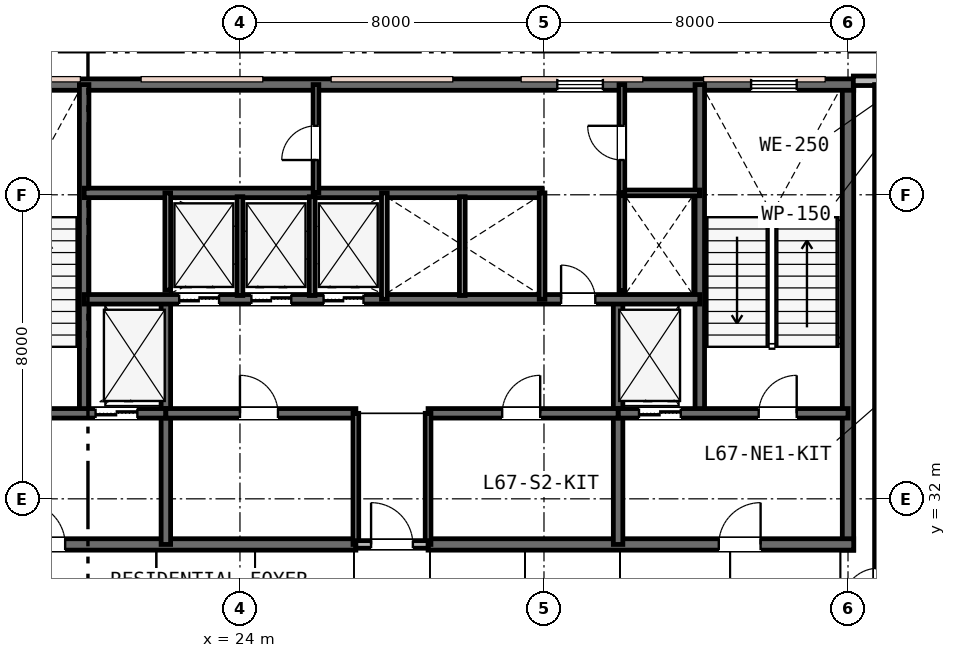
"""IFC4 building model, lengths in metres.
Left out: names, types, materials, properties, quantities, classifications, styles, units other than length and angle.
Written with IfcOpenShell. Run it as: python <this file> out.ifc"""

import sys

from ifc_helpers import new_model, si_unit, direction, frame, frame_2d, origin, place, context, subcontext, project, spatial, rectangle, extrude, element, fill, save


model = new_model("IFC4")
c1 = context("Model", 3, precision=1e-05, world=origin(), true_north=direction((0.0, 1.0)))
c2 = subcontext(c1, "Body", "Model", "MODEL_VIEW")
j1 = project(units=[si_unit("LENGTHUNIT", "METRE"), si_unit("PLANEANGLEUNIT", "RADIAN")], contexts=[c1])
p1 = place(None, origin())
s1 = spatial("IfcSite", under=j1, at=p1, CompositionType="ELEMENT")
p2 = place(p1, origin())
s2 = spatial("IfcBuilding", under=s1, at=p2, CompositionType="ELEMENT")
p3 = place(p2, frame((0.0, 0.0, 260.2)))
s3 = spatial("IfcBuildingStorey", under=s2, at=p3, CompositionType="ELEMENT", Elevation=260.2)
p4 = place(p3, frame((40.0, 30.65, 0.0), z_axis=(0.0, 0.0, 1.0), x_axis=(0.0, 1.0, 0.0)))
e1 = element("IfcWall", 1, at=p4, inside=s3, PredefinedType="SHEAR", context=c2, shape_type="SweptSolid", body=[
    extrude(rectangle(XDim=12.3, YDim=0.3, at=frame_2d((6.15, 0.0))), origin(), (0.0, 0.0, 1.0), 3.8),
])
p5 = place(p3, frame((15.85, 42.9, 0.0), z_axis=(0.0, 0.0, 1.0), x_axis=(1.0, 0.0, 0.0)))
e2 = element("IfcWall", 2, at=p5, inside=s3, PredefinedType="SHEAR", context=c2, shape_type="SweptSolid", body=[
    extrude(rectangle(XDim=24.3, YDim=0.3, at=frame_2d((12.15, 0.0))), origin(), (0.0, 0.0, 1.0), 3.8),
])
p6 = place(p5, frame((1.6, 0.0, 0.95)))
e3 = element("IfcOpeningElement", 3, at=p6, cuts=e2, PredefinedType="OPENING", context=c2, shape_type="SweptSolid", body=[
    extrude(rectangle(XDim=1.2, YDim=1.6, at=frame_2d((0.6, 0.8))), frame((0.0, 0.16, 0.0), z_axis=(0.0, -1.0, 0.0), x_axis=(1.0, 0.0, 0.0)), (0.0, 0.0, 1.0), 0.32),
])
p7 = place(p5, frame((16.5, 0.0, 0.95)))
e4 = element("IfcOpeningElement", 4, at=p7, cuts=e2, PredefinedType="OPENING", context=c2, shape_type="SweptSolid", body=[
    extrude(rectangle(XDim=1.2, YDim=1.6, at=frame_2d((0.6, 0.8))), frame((0.0, 0.16, 0.0), z_axis=(0.0, -1.0, 0.0), x_axis=(1.0, 0.0, 0.0)), (0.0, 0.0, 1.0), 0.32),
])
p8 = place(p5, frame((21.6, 0.0, 0.95)))
e5 = element("IfcOpeningElement", 5, at=p8, cuts=e2, PredefinedType="OPENING", context=c2, shape_type="SweptSolid", body=[
    extrude(rectangle(XDim=1.2, YDim=1.6, at=frame_2d((0.6, 0.8))), frame((0.0, 0.16, 0.0), z_axis=(0.0, -1.0, 0.0), x_axis=(1.0, 0.0, 0.0)), (0.0, 0.0, 1.0), 0.32),
])
p9 = place(p3, frame((15.85, 30.8, 0.0), z_axis=(0.0, 0.0, 1.0), x_axis=(1.0, 0.0, 0.0)))
e6 = element("IfcWall", 6, at=p9, inside=s3, PredefinedType="SHEAR", context=c2, shape_type="SweptSolid", body=[
    extrude(rectangle(XDim=11.2, YDim=0.3, at=frame_2d((5.6, 0.0))), origin(), (0.0, 0.0, 1.0), 3.8),
])
p10 = place(p9, frame((2.45, 0.0, 0.0)))
e7 = element("IfcOpeningElement", 7, at=p10, cuts=e6, PredefinedType="OPENING", context=c2, shape_type="SweptSolid", body=[
    extrude(rectangle(XDim=1.1, YDim=2.15, at=frame_2d((0.55, 1.075))), frame((0.0, 0.16, 0.0), z_axis=(0.0, -1.0, 0.0), x_axis=(1.0, 0.0, 0.0)), (0.0, 0.0, 1.0), 0.32),
])
p11 = place(p3, frame((28.95, 30.8, 0.0), z_axis=(0.0, 0.0, 1.0), x_axis=(1.0, 0.0, 0.0)))
e8 = element("IfcWall", 8, at=p11, inside=s3, PredefinedType="SHEAR", context=c2, shape_type="SweptSolid", body=[
    extrude(rectangle(XDim=11.2, YDim=0.3, at=frame_2d((5.6, 0.0))), origin(), (0.0, 0.0, 1.0), 3.8),
])
p12 = place(p11, frame((7.65, 0.0, 0.0)))
e9 = element("IfcOpeningElement", 9, at=p12, cuts=e8, PredefinedType="OPENING", context=c2, shape_type="SweptSolid", body=[
    extrude(rectangle(XDim=1.1, YDim=2.15, at=frame_2d((0.55, 1.075))), frame((0.0, 0.16, 0.0), z_axis=(0.0, -1.0, 0.0), x_axis=(1.0, 0.0, 0.0)), (0.0, 0.0, 1.0), 0.32),
])
for number, where, z_axis, x_axis in (
    (10, (19.9, 34.25, 0.0), (0.0, 0.0, 1.0), (0.0, 1.0, 0.0)),
    (11, (36.1, 34.25, 0.0), (0.0, 0.0, 1.0), (0.0, 1.0, 0.0)),
):
    element("IfcWall", number, at=place(p3, frame(where, z_axis=z_axis, x_axis=x_axis)), inside=s3, PredefinedType="SHEAR", context=c2, shape_type="SweptSolid", body=[
        extrude(rectangle(XDim=8.65, YDim=0.25, at=frame_2d((4.325, 0.0))), origin(), (0.0, 0.0, 1.0), 3.8),
    ])
for number, where, z_axis, x_axis in (
    (12, (22.05, 30.8, 0.0), (0.0, 0.0, 1.0), (0.0, 1.0, 0.0)),
    (13, (33.95, 30.8, 0.0), (0.0, 0.0, 1.0), (0.0, 1.0, 0.0)),
):
    element("IfcWall", number, at=place(p3, frame(where, z_axis=z_axis, x_axis=x_axis)), inside=s3, PredefinedType="SHEAR", context=c2, shape_type="SweptSolid", body=[
        extrude(rectangle(XDim=6.45, YDim=0.25, at=frame_2d((3.225, 0.0))), origin(), (0.0, 0.0, 1.0), 3.8),
    ])
p13 = place(p3, frame((16.0, 34.25, 0.0), z_axis=(0.0, 0.0, 1.0), x_axis=(1.0, 0.0, 0.0)))
e14 = element("IfcWall", 14, at=p13, inside=s3, PredefinedType="SHEAR", context=c2, shape_type="SweptSolid", body=[
    extrude(rectangle(XDim=6.05, YDim=0.25, at=frame_2d((3.025, 0.0))), origin(), (0.0, 0.0, 1.0), 3.8),
])
p14 = place(p13, frame((1.25, 0.0, 0.0)))
e15 = element("IfcOpeningElement", 15, at=p14, cuts=e14, PredefinedType="OPENING", context=c2, shape_type="SweptSolid", body=[
    extrude(rectangle(XDim=1.0, YDim=2.15, at=frame_2d((0.5, 1.075))), frame((0.0, 0.135, 0.0), z_axis=(0.0, -1.0, 0.0), x_axis=(1.0, 0.0, 0.0)), (0.0, 0.0, 1.0), 0.27),
])
p15 = place(p13, frame((4.2, 0.0, 0.0)))
e16 = element("IfcOpeningElement", 16, at=p15, cuts=e14, PredefinedType="OPENING", context=c2, shape_type="SweptSolid", body=[
    extrude(rectangle(XDim=1.1, YDim=2.15, at=frame_2d((0.55, 1.075))), frame((0.0, 0.135, 0.0), z_axis=(0.0, -1.0, 0.0), x_axis=(1.0, 0.0, 0.0)), (0.0, 0.0, 1.0), 0.27),
])
p16 = place(p3, frame((33.95, 34.25, 0.0), z_axis=(0.0, 0.0, 1.0), x_axis=(1.0, 0.0, 0.0)))
e17 = element("IfcWall", 17, at=p16, inside=s3, PredefinedType="SHEAR", context=c2, shape_type="SweptSolid", body=[
    extrude(rectangle(XDim=6.05, YDim=0.25, at=frame_2d((3.025, 0.0))), origin(), (0.0, 0.0, 1.0), 3.8),
])
p17 = place(p16, frame((3.7, 0.0, 0.0)))
e18 = element("IfcOpeningElement", 18, at=p17, cuts=e17, PredefinedType="OPENING", context=c2, shape_type="SweptSolid", body=[
    extrude(rectangle(XDim=1.0, YDim=2.15, at=frame_2d((0.5, 1.075))), frame((0.0, 0.135, 0.0), z_axis=(0.0, -1.0, 0.0), x_axis=(1.0, 0.0, 0.0)), (0.0, 0.0, 1.0), 0.27),
])
p18 = place(p16, frame((0.55, 0.0, 0.0)))
e19 = element("IfcOpeningElement", 19, at=p18, cuts=e17, PredefinedType="OPENING", context=c2, shape_type="SweptSolid", body=[
    extrude(rectangle(XDim=1.1, YDim=2.15, at=frame_2d((0.55, 1.075))), frame((0.0, 0.135, 0.0), z_axis=(0.0, -1.0, 0.0), x_axis=(1.0, 0.0, 0.0)), (0.0, 0.0, 1.0), 0.27),
])
p19 = place(p3, frame((22.05, 34.25, 0.0), z_axis=(0.0, 0.0, 1.0), x_axis=(1.0, 0.0, 0.0)))
e20 = element("IfcWall", 20, at=p19, inside=s3, PredefinedType="SHEAR", context=c2, shape_type="SweptSolid", body=[
    extrude(rectangle(XDim=5.0, YDim=0.25, at=frame_2d((2.5, 0.0))), origin(), (0.0, 0.0, 1.0), 3.8),
])
p20 = place(p19, frame((1.95, 0.0, 0.0)))
e21 = element("IfcOpeningElement", 21, at=p20, cuts=e20, PredefinedType="OPENING", context=c2, shape_type="SweptSolid", body=[
    extrude(rectangle(XDim=1.0, YDim=2.15, at=frame_2d((0.5, 1.075))), frame((0.0, 0.135, 0.0), z_axis=(0.0, -1.0, 0.0), x_axis=(1.0, 0.0, 0.0)), (0.0, 0.0, 1.0), 0.27),
])
p21 = place(p3, frame((28.95, 34.25, 0.0), z_axis=(0.0, 0.0, 1.0), x_axis=(1.0, 0.0, 0.0)))
e22 = element("IfcWall", 22, at=p21, inside=s3, PredefinedType="SHEAR", context=c2, shape_type="SweptSolid", body=[
    extrude(rectangle(XDim=5.0, YDim=0.25, at=frame_2d((2.5, 0.0))), origin(), (0.0, 0.0, 1.0), 3.8),
])
p22 = place(p21, frame((1.95, 0.0, 0.0)))
e23 = element("IfcOpeningElement", 23, at=p22, cuts=e22, PredefinedType="OPENING", context=c2, shape_type="SweptSolid", body=[
    extrude(rectangle(XDim=1.0, YDim=2.15, at=frame_2d((0.5, 1.075))), frame((0.0, 0.135, 0.0), z_axis=(0.0, -1.0, 0.0), x_axis=(1.0, 0.0, 0.0)), (0.0, 0.0, 1.0), 0.27),
])
p23 = place(p3, frame((19.9, 37.25, 0.0), z_axis=(0.0, 0.0, 1.0), x_axis=(1.0, 0.0, 0.0)))
e24 = element("IfcWall", 24, at=p23, inside=s3, PredefinedType="SHEAR", context=c2, shape_type="SweptSolid", body=[
    extrude(rectangle(XDim=16.2, YDim=0.25, at=frame_2d((8.1, 0.0))), origin(), (0.0, 0.0, 1.0), 3.8),
])
p24 = place(p23, frame((12.55, 0.0, 0.0)))
e25 = element("IfcOpeningElement", 25, at=p24, cuts=e24, PredefinedType="OPENING", context=c2, shape_type="SweptSolid", body=[
    extrude(rectangle(XDim=0.9, YDim=2.15, at=frame_2d((0.45, 1.075))), frame((0.0, 0.135, 0.0), z_axis=(0.0, -1.0, 0.0), x_axis=(1.0, 0.0, 0.0)), (0.0, 0.0, 1.0), 0.27),
])
p25 = place(p23, frame((2.5, 0.0, 0.0)))
e26 = element("IfcOpeningElement", 26, at=p25, cuts=e24, PredefinedType="OPENING", context=c2, shape_type="SweptSolid", body=[
    extrude(rectangle(XDim=1.05, YDim=2.15, at=frame_2d((0.525, 1.075))), frame((0.0, 0.135, 0.0), z_axis=(0.0, -1.0, 0.0), x_axis=(1.0, 0.0, 0.0)), (0.0, 0.0, 1.0), 0.27),
])
p26 = place(p23, frame((4.4, 0.0, 0.0)))
e27 = element("IfcOpeningElement", 27, at=p26, cuts=e24, PredefinedType="OPENING", context=c2, shape_type="SweptSolid", body=[
    extrude(rectangle(XDim=1.05, YDim=2.15, at=frame_2d((0.525, 1.075))), frame((0.0, 0.135, 0.0), z_axis=(0.0, -1.0, 0.0), x_axis=(1.0, 0.0, 0.0)), (0.0, 0.0, 1.0), 0.27),
])
p27 = place(p23, frame((6.3, 0.0, 0.0)))
e28 = element("IfcOpeningElement", 28, at=p27, cuts=e24, PredefinedType="OPENING", context=c2, shape_type="SweptSolid", body=[
    extrude(rectangle(XDim=1.05, YDim=2.15, at=frame_2d((0.525, 1.075))), frame((0.0, 0.135, 0.0), z_axis=(0.0, -1.0, 0.0), x_axis=(1.0, 0.0, 0.0)), (0.0, 0.0, 1.0), 0.27),
])
p28 = place(p3, frame((19.9, 40.05, 0.0), z_axis=(0.0, 0.0, 1.0), x_axis=(1.0, 0.0, 0.0)))
e29 = element("IfcWall", 29, at=p28, inside=s3, PredefinedType="SHEAR", context=c2, shape_type="SweptSolid", body=[
    extrude(rectangle(XDim=12.05, YDim=0.25, at=frame_2d((6.025, 0.0))), origin(), (0.0, 0.0, 1.0), 3.8),
])
p29 = place(p3, frame((43.0, 43.0, 0.0), z_axis=(0.0, 0.0, 1.0), x_axis=(-1.0, 0.0, 0.0)))
e30 = element("IfcWall", 30, at=p29, inside=s3, PredefinedType="STANDARD", context=c2, shape_type="SweptSolid", body=[
    extrude(rectangle(XDim=2.86, YDim=0.25, at=frame_2d((1.43, 0.0))), origin(), (0.0, 0.0, 1.0), 3.53),
])
p30 = place(p29, frame((0.51, 0.0, 0.85)))
e31 = element("IfcOpeningElement", 31, at=p30, cuts=e30, PredefinedType="OPENING", context=c2, shape_type="SweptSolid", body=[
    extrude(rectangle(XDim=1.2, YDim=1.6, at=frame_2d((0.6, 0.8))), frame((0.0, 0.135, 0.0), z_axis=(0.0, -1.0, 0.0), x_axis=(1.0, 0.0, 0.0)), (0.0, 0.0, 1.0), 0.27),
])
for number, where, z_axis, x_axis in (
    (32, (27.05, 30.8, 0.0), (0.0, 0.0, 1.0), (0.0, 1.0, 0.0)),
    (33, (28.95, 30.8, 0.0), (0.0, 0.0, 1.0), (0.0, 1.0, 0.0)),
):
    element("IfcWall", number, at=place(p3, frame(where, z_axis=z_axis, x_axis=x_axis)), inside=s3, PredefinedType="PLUMBINGWALL", context=c2, shape_type="SweptSolid", body=[
        extrude(rectangle(XDim=3.45, YDim=0.15, at=frame_2d((1.725, 0.0))), origin(), (0.0, 0.0, 1.0), 3.28),
    ])
p31 = place(p3, frame((27.05, 30.8, 0.0), z_axis=(0.0, 0.0, 1.0), x_axis=(1.0, 0.0, 0.0)))
e34 = element("IfcWall", 34, at=p31, inside=s3, PredefinedType="PARTITIONING", context=c2, shape_type="SweptSolid", body=[
    extrude(rectangle(XDim=1.9, YDim=0.2, at=frame_2d((0.95, 0.0))), origin(), (0.0, 0.0, 1.0), 3.28),
])
p32 = place(p31, frame((0.4, 0.0, 0.0)))
e35 = element("IfcOpeningElement", 35, at=p32, cuts=e34, PredefinedType="OPENING", context=c2, shape_type="SweptSolid", body=[
    extrude(rectangle(XDim=1.1, YDim=2.15, at=frame_2d((0.55, 1.075))), frame((0.0, 0.11, 0.0), z_axis=(0.0, -1.0, 0.0), x_axis=(1.0, 0.0, 0.0)), (0.0, 0.0, 1.0), 0.22),
])
p33 = place(p3, frame((22.1, 37.49, 0.0), z_axis=(0.0, 0.0, 1.0), x_axis=(0.0, 1.0, 0.0)))
e36 = element("IfcWall", 36, at=p33, inside=s3, PredefinedType="PLUMBINGWALL", context=c2, shape_type="SweptSolid", body=[
    extrude(rectangle(XDim=2.56, YDim=0.15, at=frame_2d((1.28, 0.0))), origin(), (0.0, 0.0, 1.0), 3.53),
])
p34 = place(p3, frame((27.8, 37.25, 0.0), z_axis=(0.0, 0.0, 1.0), x_axis=(0.0, 1.0, 0.0)))
e37 = element("IfcWall", 37, at=p34, inside=s3, PredefinedType="PLUMBINGWALL", context=c2, shape_type="SweptSolid", body=[
    extrude(rectangle(XDim=2.8, YDim=0.15, at=frame_2d((1.4, 0.0))), origin(), (0.0, 0.0, 1.0), 3.53),
])
for number, where, z_axis, x_axis in (
    (38, (24.0, 37.35, 0.0), (0.0, 0.0, 1.0), (0.0, 1.0, 0.0)),
    (39, (25.9, 37.35, 0.0), (0.0, 0.0, 1.0), (0.0, 1.0, 0.0)),
):
    element("IfcWall", number, at=place(p3, frame(where, z_axis=z_axis, x_axis=x_axis)), inside=s3, PredefinedType="PLUMBINGWALL", context=c2, shape_type="SweptSolid", body=[
        extrude(rectangle(XDim=2.6, YDim=0.15, at=frame_2d((1.3, 0.0))), origin(), (0.0, 0.0, 1.0), 3.53),
    ])
p35 = place(p3, frame((31.95, 37.25, 0.0), z_axis=(0.0, 0.0, 1.0), x_axis=(0.0, 1.0, 0.0)))
e40 = element("IfcWall", 40, at=p35, inside=s3, PredefinedType="PLUMBINGWALL", context=c2, shape_type="SweptSolid", body=[
    extrude(rectangle(XDim=2.8, YDim=0.15, at=frame_2d((1.4, 0.0))), origin(), (0.0, 0.0, 1.0), 3.53),
])
p36 = place(p3, frame((29.85, 37.35, 0.0), z_axis=(0.0, 0.0, 1.0), x_axis=(0.0, 1.0, 0.0)))
e41 = element("IfcWall", 41, at=p36, inside=s3, PredefinedType="PLUMBINGWALL", context=c2, shape_type="SweptSolid", body=[
    extrude(rectangle(XDim=2.6, YDim=0.15, at=frame_2d((1.3, 0.0))), origin(), (0.0, 0.0, 1.0), 3.53),
])
p37 = place(p3, frame((34.05, 37.473, 0.0), z_axis=(0.0, 0.0, 1.0), x_axis=(0.0, 1.0, 0.0)))
e42 = element("IfcWall", 42, at=p37, inside=s3, PredefinedType="PLUMBINGWALL", context=c2, shape_type="SweptSolid", body=[
    extrude(rectangle(XDim=2.577, YDim=0.15, at=frame_2d((1.288, 0.0))), origin(), (0.0, 0.0, 1.0), 3.53),
])
p38 = place(p3, frame((34.05, 40.05, 0.0), z_axis=(0.0, 0.0, 1.0), x_axis=(1.0, 0.0, 0.0)))
e43 = element("IfcWall", 43, at=p38, inside=s3, PredefinedType="PARTITIONING", context=c2, shape_type="SweptSolid", body=[
    extrude(rectangle(XDim=2.05, YDim=0.15, at=frame_2d((1.025, 0.0))), origin(), (0.0, 0.0, 1.0), 3.53),
])
p39 = place(p3, frame((34.05, 40.05, 0.0), z_axis=(0.0, 0.0, 1.0), x_axis=(0.0, 1.0, 0.0)))
e44 = element("IfcWall", 44, at=p39, inside=s3, PredefinedType="PARTITIONING", context=c2, shape_type="SweptSolid", body=[
    extrude(rectangle(XDim=2.85, YDim=0.15, at=frame_2d((1.425, 0.0))), origin(), (0.0, 0.0, 1.0), 3.53),
])
p40 = place(p39, frame((0.865, 0.0, 0.0)))
e45 = element("IfcOpeningElement", 45, at=p40, cuts=e44, PredefinedType="OPENING", context=c2, shape_type="SweptSolid", body=[
    extrude(rectangle(XDim=0.9, YDim=2.15, at=frame_2d((0.45, 1.075))), frame((0.0, 0.085, 0.0), z_axis=(0.0, -1.0, 0.0), x_axis=(1.0, 0.0, 0.0)), (0.0, 0.0, 1.0), 0.17),
])
p41 = place(p3, frame((26.0, 40.05, 0.0), z_axis=(0.0, 0.0, 1.0), x_axis=(0.0, 1.0, 0.0)))
e46 = element("IfcWall", 46, at=p41, inside=s3, PredefinedType="PARTITIONING", context=c2, shape_type="SweptSolid", body=[
    extrude(rectangle(XDim=2.85, YDim=0.15, at=frame_2d((1.425, 0.0))), origin(), (0.0, 0.0, 1.0), 3.53),
])
p42 = place(p41, frame((0.865, 0.0, 0.0)))
e47 = element("IfcOpeningElement", 47, at=p42, cuts=e46, PredefinedType="OPENING", context=c2, shape_type="SweptSolid", body=[
    extrude(rectangle(XDim=0.9, YDim=2.15, at=frame_2d((0.45, 1.075))), frame((0.0, 0.085, 0.0), z_axis=(0.0, -1.0, 0.0), x_axis=(1.0, 0.0, 0.0)), (0.0, 0.0, 1.0), 0.17),
])
p43 = place(p3, frame((40.8, 28.6, 0.0), z_axis=(0.0, 0.0, 1.0), x_axis=(0.0, 1.0, 0.0)))
e48 = element("IfcWall", 48, at=p43, inside=s3, PredefinedType="PARTITIONING", context=c2, shape_type="SweptSolid", body=[
    extrude(rectangle(XDim=14.3, YDim=0.2, at=frame_2d((7.15, 0.0))), origin(), (0.0, 0.0, 1.0), 3.16),
])
p44 = place(p43, frame((0.625, 0.0, 0.0)))
e49 = element("IfcOpeningElement", 49, at=p44, cuts=e48, PredefinedType="OPENING", context=c2, shape_type="SweptSolid", body=[
    extrude(rectangle(XDim=0.95, YDim=2.15, at=frame_2d((0.475, 1.075))), frame((0.0, 0.11, 0.0), z_axis=(0.0, -1.0, 0.0), x_axis=(1.0, 0.0, 0.0)), (0.0, 0.0, 1.0), 0.22),
])
p45 = place(p7, origin())
e50 = element("IfcWindow", 50, at=p45, inside=s3, PartitioningType="SINGLE_PANEL", PredefinedType="WINDOW", context=c2, shape_type="SweptSolid", body=[
    extrude(rectangle(XDim=1.2, YDim=1.6, at=frame_2d((0.6, 0.8))), frame((0.0, 0.03, 0.0), z_axis=(0.0, -1.0, 0.0), x_axis=(1.0, 0.0, 0.0)), (0.0, 0.0, 1.0), 0.06),
])
fill(e4, e50)
p46 = place(p8, origin())
e51 = element("IfcWindow", 51, at=p46, inside=s3, PartitioningType="SINGLE_PANEL", PredefinedType="WINDOW", context=c2, shape_type="SweptSolid", body=[
    extrude(rectangle(XDim=1.2, YDim=1.6, at=frame_2d((0.6, 0.8))), frame((0.0, 0.03, 0.0), z_axis=(0.0, -1.0, 0.0), x_axis=(1.0, 0.0, 0.0)), (0.0, 0.0, 1.0), 0.06),
])
fill(e5, e51)
p47 = place(p32, origin())
e52 = element("IfcDoor", 52, at=p47, inside=s3, OperationType="SINGLE_SWING_LEFT", PredefinedType="DOOR", context=c2, shape_type="SweptSolid", body=[
    extrude(rectangle(XDim=1.1, YDim=2.15, at=frame_2d((0.55, 1.075))), frame((0.0, 0.025, 0.0), z_axis=(0.0, -1.0, 0.0), x_axis=(1.0, 0.0, 0.0)), (0.0, 0.0, 1.0), 0.05),
])
fill(e35, e52)
p48 = place(p17, origin())
e53 = element("IfcDoor", 53, at=p48, inside=s3, OperationType="SINGLE_SWING_RIGHT", PredefinedType="DOOR", context=c2, shape_type="SweptSolid", body=[
    extrude(rectangle(XDim=1.0, YDim=2.15, at=frame_2d((0.5, 1.075))), frame((0.0, 0.025, 0.0), z_axis=(0.0, -1.0, 0.0), x_axis=(1.0, 0.0, 0.0)), (0.0, 0.0, 1.0), 0.05),
])
fill(e18, e53)
p49 = place(p10, origin())
e54 = element("IfcDoor", 54, at=p49, inside=s3, OperationType="SINGLE_SWING_LEFT", PredefinedType="DOOR", context=c2, shape_type="SweptSolid", body=[
    extrude(rectangle(XDim=1.1, YDim=2.15, at=frame_2d((0.55, 1.075))), frame((0.0, 0.025, 0.0), z_axis=(0.0, -1.0, 0.0), x_axis=(1.0, 0.0, 0.0)), (0.0, 0.0, 1.0), 0.05),
])
fill(e7, e54)
p50 = place(p12, origin())
e55 = element("IfcDoor", 55, at=p50, inside=s3, OperationType="SINGLE_SWING_RIGHT", PredefinedType="DOOR", context=c2, shape_type="SweptSolid", body=[
    extrude(rectangle(XDim=1.1, YDim=2.15, at=frame_2d((0.55, 1.075))), frame((0.0, 0.025, 0.0), z_axis=(0.0, -1.0, 0.0), x_axis=(1.0, 0.0, 0.0)), (0.0, 0.0, 1.0), 0.05),
])
fill(e9, e55)
p51 = place(p20, origin())
e56 = element("IfcDoor", 56, at=p51, inside=s3, OperationType="SINGLE_SWING_LEFT", PredefinedType="DOOR", context=c2, shape_type="SweptSolid", body=[
    extrude(rectangle(XDim=1.0, YDim=2.15, at=frame_2d((0.5, 1.075))), frame((0.0, 0.025, 0.0), z_axis=(0.0, -1.0, 0.0), x_axis=(1.0, 0.0, 0.0)), (0.0, 0.0, 1.0), 0.05),
])
fill(e21, e56)
p52 = place(p22, origin())
e57 = element("IfcDoor", 57, at=p52, inside=s3, OperationType="SINGLE_SWING_RIGHT", PredefinedType="DOOR", context=c2, shape_type="SweptSolid", body=[
    extrude(rectangle(XDim=1.0, YDim=2.15, at=frame_2d((0.5, 1.075))), frame((0.0, 0.025, 0.0), z_axis=(0.0, -1.0, 0.0), x_axis=(1.0, 0.0, 0.0)), (0.0, 0.0, 1.0), 0.05),
])
fill(e23, e57)
p53 = place(p24, origin())
e58 = element("IfcDoor", 58, at=p53, inside=s3, OperationType="SINGLE_SWING_LEFT", PredefinedType="DOOR", context=c2, shape_type="SweptSolid", body=[
    extrude(rectangle(XDim=0.9, YDim=2.15, at=frame_2d((0.45, 1.075))), frame((0.0, 0.025, 0.0), z_axis=(0.0, -1.0, 0.0), x_axis=(1.0, 0.0, 0.0)), (0.0, 0.0, 1.0), 0.05),
])
fill(e25, e58)
p54 = place(p40, origin())
e59 = element("IfcDoor", 59, at=p54, inside=s3, OperationType="SINGLE_SWING_RIGHT", PredefinedType="DOOR", context=c2, shape_type="SweptSolid", body=[
    extrude(rectangle(XDim=0.9, YDim=2.15, at=frame_2d((0.45, 1.075))), frame((0.0, 0.025, 0.0), z_axis=(0.0, -1.0, 0.0), x_axis=(1.0, 0.0, 0.0)), (0.0, 0.0, 1.0), 0.05),
])
fill(e45, e59)
p55 = place(p42, origin())
e60 = element("IfcDoor", 60, at=p55, inside=s3, OperationType="SINGLE_SWING_LEFT", PredefinedType="DOOR", context=c2, shape_type="SweptSolid", body=[
    extrude(rectangle(XDim=0.9, YDim=2.15, at=frame_2d((0.45, 1.075))), frame((0.0, 0.025, 0.0), z_axis=(0.0, -1.0, 0.0), x_axis=(1.0, 0.0, 0.0)), (0.0, 0.0, 1.0), 0.05),
])
fill(e47, e60)
p56 = place(p15, origin())
e61 = element("IfcDoor", 61, at=p56, inside=s3, OperationType="DOUBLE_DOOR_SLIDING", PredefinedType="DOOR", context=c2, shape_type="SweptSolid", body=[
    extrude(rectangle(XDim=1.1, YDim=2.15, at=frame_2d((0.55, 1.075))), frame((0.0, 0.025, 0.0), z_axis=(0.0, -1.0, 0.0), x_axis=(1.0, 0.0, 0.0)), (0.0, 0.0, 1.0), 0.05),
])
fill(e16, e61)
p57 = place(p18, origin())
e62 = element("IfcDoor", 62, at=p57, inside=s3, OperationType="DOUBLE_DOOR_SLIDING", PredefinedType="DOOR", context=c2, shape_type="SweptSolid", body=[
    extrude(rectangle(XDim=1.1, YDim=2.15, at=frame_2d((0.55, 1.075))), frame((0.0, 0.025, 0.0), z_axis=(0.0, -1.0, 0.0), x_axis=(1.0, 0.0, 0.0)), (0.0, 0.0, 1.0), 0.05),
])
fill(e19, e62)
p58 = place(p25, origin())
e63 = element("IfcDoor", 63, at=p58, inside=s3, OperationType="DOUBLE_DOOR_SLIDING", PredefinedType="DOOR", context=c2, shape_type="SweptSolid", body=[
    extrude(rectangle(XDim=1.05, YDim=2.15, at=frame_2d((0.525, 1.075))), frame((0.0, 0.025, 0.0), z_axis=(0.0, -1.0, 0.0), x_axis=(1.0, 0.0, 0.0)), (0.0, 0.0, 1.0), 0.05),
])
fill(e26, e63)
p59 = place(p26, origin())
e64 = element("IfcDoor", 64, at=p59, inside=s3, OperationType="DOUBLE_DOOR_SLIDING", PredefinedType="DOOR", context=c2, shape_type="SweptSolid", body=[
    extrude(rectangle(XDim=1.05, YDim=2.15, at=frame_2d((0.525, 1.075))), frame((0.0, 0.025, 0.0), z_axis=(0.0, -1.0, 0.0), x_axis=(1.0, 0.0, 0.0)), (0.0, 0.0, 1.0), 0.05),
])
fill(e27, e64)
p60 = place(p27, origin())
e65 = element("IfcDoor", 65, at=p60, inside=s3, OperationType="DOUBLE_DOOR_SLIDING", PredefinedType="DOOR", context=c2, shape_type="SweptSolid", body=[
    extrude(rectangle(XDim=1.05, YDim=2.15, at=frame_2d((0.525, 1.075))), frame((0.0, 0.025, 0.0), z_axis=(0.0, -1.0, 0.0), x_axis=(1.0, 0.0, 0.0)), (0.0, 0.0, 1.0), 0.05),
])
fill(e28, e65)
save(model, sys.argv[1])
